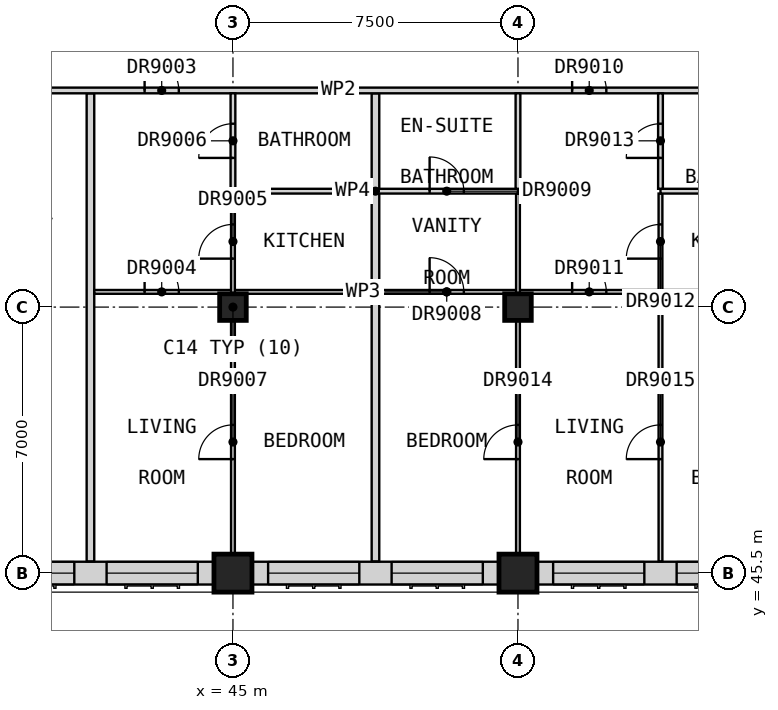
"""IFC4 building model, lengths in metres.
Left out: names, types, materials, properties, quantities, classifications, styles, units other than length and angle.
Written with IfcOpenShell. Run it as: python <this file> out.ifc"""

import sys

from ifc_helpers import new_model, si_unit, direction, frame, frame_2d, origin, origin_2d, place, context, subcontext, project, spatial, rectangle, extrude, element, fill, save


model = new_model("IFC4")
c1 = context("Model", 3, precision=1e-05, world=origin(), true_north=direction((0.0, 1.0)))
c2 = subcontext(c1, "Body", "Model", "MODEL_VIEW")
j1 = project(units=[si_unit("LENGTHUNIT", "METRE"), si_unit("PLANEANGLEUNIT", "RADIAN")], contexts=[c1])
p1 = place(None, origin())
s1 = spatial("IfcSite", under=j1, at=p1, CompositionType="ELEMENT")
p2 = place(p1, origin())
s2 = spatial("IfcBuilding", under=s1, at=p2, CompositionType="ELEMENT")
p3 = place(p2, frame((0.0, 0.0, 269.7)))
s3 = spatial("IfcBuildingStorey", under=s2, at=p3, CompositionType="ELEMENT", Elevation=269.7)
p4 = place(p3, frame((45.0, 45.5, 0.0), z_axis=(0.0, 0.0, 1.0), x_axis=(1.0, 0.0, 0.0)))
e1 = element("IfcColumn", 1, at=p4, inside=s3, PredefinedType="COLUMN", context=c2, shape_type="SweptSolid", body=[
    extrude(rectangle(XDim=1.0, YDim=1.0, at=origin_2d()), origin(), (0.0, 0.0, 1.0), 3.5),
])
p5 = place(p3, frame((45.0, 52.5, 0.0), z_axis=(0.0, 0.0, 1.0), x_axis=(1.0, 0.0, 0.0)))
e2 = element("IfcColumn", 2, at=p5, inside=s3, PredefinedType="COLUMN", context=c2, shape_type="SweptSolid", body=[
    extrude(rectangle(XDim=0.7, YDim=0.7, at=origin_2d()), origin(), (0.0, 0.0, 1.0), 3.5),
])
p6 = place(p3, frame((52.5, 45.5, 0.0), z_axis=(0.0, 0.0, 1.0), x_axis=(1.0, 0.0, 0.0)))
e3 = element("IfcColumn", 3, at=p6, inside=s3, PredefinedType="COLUMN", context=c2, shape_type="SweptSolid", body=[
    extrude(rectangle(XDim=1.0, YDim=1.0, at=origin_2d()), origin(), (0.0, 0.0, 1.0), 3.5),
])
p7 = place(p3, frame((52.5, 52.5, 0.0), z_axis=(0.0, 0.0, 1.0), x_axis=(1.0, 0.0, 0.0)))
e4 = element("IfcColumn", 4, at=p7, inside=s3, PredefinedType="COLUMN", context=c2, shape_type="SweptSolid", body=[
    extrude(rectangle(XDim=0.7, YDim=0.7, at=origin_2d()), origin(), (0.0, 0.0, 1.0), 3.5),
])
p8 = place(p3, frame((38.0, 45.5, 0.0), z_axis=(0.0, 0.0, 1.0), x_axis=(1.0, 0.0, 0.0)))
e5 = element("IfcWall", 5, at=p8, inside=s3, PredefinedType="SOLIDWALL", context=c2, shape_type="SweptSolid", body=[
    extrude(rectangle(XDim=6.5, YDim=0.6, at=frame_2d((3.25, 0.0))), origin(), (0.0, 0.0, 1.0), 2.75),
])
p9 = place(p8, frame((0.425, 0.0, 0.8)))
e6 = element("IfcOpeningElement", 6, at=p9, cuts=e5, PredefinedType="OPENING", context=c2, shape_type="SweptSolid", body=[
    extrude(rectangle(XDim=2.4, YDim=1.8, at=frame_2d((1.2, 0.9))), frame((0.0, 0.31, 0.0), z_axis=(0.0, -1.0, 0.0), x_axis=(1.0, 0.0, 0.0)), (0.0, 0.0, 1.0), 0.62),
])
p10 = place(p8, frame((3.675, 0.0, 0.8)))
e7 = element("IfcOpeningElement", 7, at=p10, cuts=e5, PredefinedType="OPENING", context=c2, shape_type="SweptSolid", body=[
    extrude(rectangle(XDim=2.4, YDim=1.8, at=frame_2d((1.2, 0.9))), frame((0.0, 0.31, 0.0), z_axis=(0.0, -1.0, 0.0), x_axis=(1.0, 0.0, 0.0)), (0.0, 0.0, 1.0), 0.62),
])
p11 = place(p3, frame((45.5, 45.5, 0.0), z_axis=(0.0, 0.0, 1.0), x_axis=(1.0, 0.0, 0.0)))
e8 = element("IfcWall", 8, at=p11, inside=s3, PredefinedType="SOLIDWALL", context=c2, shape_type="SweptSolid", body=[
    extrude(rectangle(XDim=6.5, YDim=0.6, at=frame_2d((3.25, 0.0))), origin(), (0.0, 0.0, 1.0), 2.75),
])
p12 = place(p11, frame((0.425, 0.0, 0.8)))
e9 = element("IfcOpeningElement", 9, at=p12, cuts=e8, PredefinedType="OPENING", context=c2, shape_type="SweptSolid", body=[
    extrude(rectangle(XDim=2.4, YDim=1.8, at=frame_2d((1.2, 0.9))), frame((0.0, 0.31, 0.0), z_axis=(0.0, -1.0, 0.0), x_axis=(1.0, 0.0, 0.0)), (0.0, 0.0, 1.0), 0.62),
])
p13 = place(p11, frame((3.675, 0.0, 0.8)))
e10 = element("IfcOpeningElement", 10, at=p13, cuts=e8, PredefinedType="OPENING", context=c2, shape_type="SweptSolid", body=[
    extrude(rectangle(XDim=2.4, YDim=1.8, at=frame_2d((1.2, 0.9))), frame((0.0, 0.31, 0.0), z_axis=(0.0, -1.0, 0.0), x_axis=(1.0, 0.0, 0.0)), (0.0, 0.0, 1.0), 0.62),
])
p14 = place(p3, frame((53.0, 45.5, 0.0), z_axis=(0.0, 0.0, 1.0), x_axis=(1.0, 0.0, 0.0)))
e11 = element("IfcWall", 11, at=p14, inside=s3, PredefinedType="SOLIDWALL", context=c2, shape_type="SweptSolid", body=[
    extrude(rectangle(XDim=6.5, YDim=0.6, at=frame_2d((3.25, 0.0))), origin(), (0.0, 0.0, 1.0), 2.75),
])
p15 = place(p14, frame((0.425, 0.0, 0.8)))
e12 = element("IfcOpeningElement", 12, at=p15, cuts=e11, PredefinedType="OPENING", context=c2, shape_type="SweptSolid", body=[
    extrude(rectangle(XDim=2.4, YDim=1.8, at=frame_2d((1.2, 0.9))), frame((0.0, 0.31, 0.0), z_axis=(0.0, -1.0, 0.0), x_axis=(1.0, 0.0, 0.0)), (0.0, 0.0, 1.0), 0.62),
])
p16 = place(p14, frame((3.675, 0.0, 0.8)))
e13 = element("IfcOpeningElement", 13, at=p16, cuts=e11, PredefinedType="OPENING", context=c2, shape_type="SweptSolid", body=[
    extrude(rectangle(XDim=2.4, YDim=1.8, at=frame_2d((1.2, 0.9))), frame((0.0, 0.31, 0.0), z_axis=(0.0, -1.0, 0.0), x_axis=(1.0, 0.0, 0.0)), (0.0, 0.0, 1.0), 0.62),
])
for number, where, z_axis, x_axis in (
    (14, (41.25, 45.81, 0.0), (0.0, 0.0, 1.0), (0.0, 1.0, 0.0)),
    (15, (48.75, 45.81, 0.0), (0.0, 0.0, 1.0), (0.0, 1.0, 0.0)),
):
    element("IfcWall", number, at=place(p3, frame(where, z_axis=z_axis, x_axis=x_axis)), inside=s3, PredefinedType="PARTITIONING", context=c2, shape_type="SweptSolid", body=[
        extrude(rectangle(XDim=12.315, YDim=0.2, at=frame_2d((6.157, 0.0))), origin(), (0.0, 0.0, 1.0), 3.25),
    ])
p17 = place(p3, frame((33.75, 58.2, 0.0), z_axis=(0.0, 0.0, 1.0), x_axis=(1.0, 0.0, 0.0)))
e16 = element("IfcWall", 16, at=p17, inside=s3, PredefinedType="PARTITIONING", context=c2, shape_type="SweptSolid", body=[
    extrude(rectangle(XDim=28.05, YDim=0.15, at=frame_2d((14.025, 0.0))), origin(), (0.0, 0.0, 1.0), 3.25),
])
p18 = place(p17, frame((3.25, 0.0, 0.0)))
e17 = element("IfcOpeningElement", 17, at=p18, cuts=e16, PredefinedType="OPENING", context=c2, shape_type="SweptSolid", body=[
    extrude(rectangle(XDim=1.0, YDim=2.1, at=frame_2d((0.5, 1.05))), frame((0.0, 0.085, 0.0), z_axis=(0.0, -1.0, 0.0), x_axis=(1.0, 0.0, 0.0)), (0.0, 0.0, 1.0), 0.17),
])
p19 = place(p17, frame((8.925, 0.0, 0.0)))
e18 = element("IfcOpeningElement", 18, at=p19, cuts=e16, PredefinedType="OPENING", context=c2, shape_type="SweptSolid", body=[
    extrude(rectangle(XDim=0.9, YDim=2.1, at=frame_2d((0.45, 1.05))), frame((0.0, 0.085, 0.0), z_axis=(0.0, -1.0, 0.0), x_axis=(1.0, 0.0, 0.0)), (0.0, 0.0, 1.0), 0.17),
])
p20 = place(p17, frame((20.175, 0.0, 0.0)))
e19 = element("IfcOpeningElement", 19, at=p20, cuts=e16, PredefinedType="OPENING", context=c2, shape_type="SweptSolid", body=[
    extrude(rectangle(XDim=0.9, YDim=2.1, at=frame_2d((0.45, 1.05))), frame((0.0, 0.085, 0.0), z_axis=(0.0, -1.0, 0.0), x_axis=(1.0, 0.0, 0.0)), (0.0, 0.0, 1.0), 0.17),
])
p21 = place(p17, frame((26.65, 0.0, 0.0)))
e20 = element("IfcOpeningElement", 20, at=p21, cuts=e16, PredefinedType="OPENING", context=c2, shape_type="SweptSolid", body=[
    extrude(rectangle(XDim=1.0, YDim=2.1, at=frame_2d((0.5, 1.05))), frame((0.0, 0.085, 0.0), z_axis=(0.0, -1.0, 0.0), x_axis=(1.0, 0.0, 0.0)), (0.0, 0.0, 1.0), 0.17),
])
p22 = place(p3, frame((41.35, 52.9, 0.0), z_axis=(0.0, 0.0, 1.0), x_axis=(1.0, 0.0, 0.0)))
e21 = element("IfcWall", 21, at=p22, inside=s3, PredefinedType="PARTITIONING", context=c2, shape_type="SweptSolid", body=[
    extrude(rectangle(XDim=18.55, YDim=0.1, at=frame_2d((9.275, 0.0))), origin(), (0.0, 0.0, 1.0), 3.25),
])
p23 = place(p22, frame((1.325, 0.0, 0.0)))
e22 = element("IfcOpeningElement", 22, at=p23, cuts=e21, PredefinedType="OPENING", context=c2, shape_type="SweptSolid", body=[
    extrude(rectangle(XDim=0.9, YDim=2.1, at=frame_2d((0.45, 1.05))), frame((0.0, 0.06, 0.0), z_axis=(0.0, -1.0, 0.0), x_axis=(1.0, 0.0, 0.0)), (0.0, 0.0, 1.0), 0.12),
])
p24 = place(p22, frame((8.825, 0.0, 0.0)))
e23 = element("IfcOpeningElement", 23, at=p24, cuts=e21, PredefinedType="OPENING", context=c2, shape_type="SweptSolid", body=[
    extrude(rectangle(XDim=0.9, YDim=2.1, at=frame_2d((0.45, 1.05))), frame((0.0, 0.06, 0.0), z_axis=(0.0, -1.0, 0.0), x_axis=(1.0, 0.0, 0.0)), (0.0, 0.0, 1.0), 0.12),
])
p25 = place(p22, frame((12.575, 0.0, 0.0)))
e24 = element("IfcOpeningElement", 24, at=p25, cuts=e21, PredefinedType="OPENING", context=c2, shape_type="SweptSolid", body=[
    extrude(rectangle(XDim=0.9, YDim=2.1, at=frame_2d((0.45, 1.05))), frame((0.0, 0.06, 0.0), z_axis=(0.0, -1.0, 0.0), x_axis=(1.0, 0.0, 0.0)), (0.0, 0.0, 1.0), 0.12),
])
p26 = place(p3, frame((45.0, 45.0, 0.0), z_axis=(0.0, 0.0, 1.0), x_axis=(0.0, 1.0, 0.0)))
e25 = element("IfcWall", 25, at=p26, inside=s3, PredefinedType="PARTITIONING", context=c2, shape_type="SweptSolid", body=[
    extrude(rectangle(XDim=10.488, YDim=0.1, at=frame_2d((5.244, 0.0))), origin(), (0.0, 0.0, 1.0), 3.25),
])
p27 = place(p26, frame((8.775, 0.0, 0.0)))
e26 = element("IfcOpeningElement", 26, at=p27, cuts=e25, PredefinedType="OPENING", context=c2, shape_type="SweptSolid", body=[
    extrude(rectangle(XDim=0.9, YDim=2.1, at=frame_2d((0.45, 1.05))), frame((0.0, 0.06, 0.0), z_axis=(0.0, -1.0, 0.0), x_axis=(1.0, 0.0, 0.0)), (0.0, 0.0, 1.0), 0.12),
])
p28 = place(p26, frame((3.5, 0.0, 0.0)))
e27 = element("IfcOpeningElement", 27, at=p28, cuts=e25, PredefinedType="OPENING", context=c2, shape_type="SweptSolid", body=[
    extrude(rectangle(XDim=0.9, YDim=2.1, at=frame_2d((0.45, 1.05))), frame((0.0, 0.06, 0.0), z_axis=(0.0, -1.0, 0.0), x_axis=(1.0, 0.0, 0.0)), (0.0, 0.0, 1.0), 0.12),
])
p29 = place(p3, frame((52.5, 45.0, 0.0), z_axis=(0.0, 0.0, 1.0), x_axis=(0.0, 1.0, 0.0)))
e28 = element("IfcWall", 28, at=p29, inside=s3, PredefinedType="PARTITIONING", context=c2, shape_type="SweptSolid", body=[
    extrude(rectangle(XDim=10.488, YDim=0.1, at=frame_2d((5.244, 0.0))), origin(), (0.0, 0.0, 1.0), 3.25),
])
p30 = place(p29, frame((3.5, 0.0, 0.0)))
e29 = element("IfcOpeningElement", 29, at=p30, cuts=e28, PredefinedType="OPENING", context=c2, shape_type="SweptSolid", body=[
    extrude(rectangle(XDim=0.9, YDim=2.1, at=frame_2d((0.45, 1.05))), frame((0.0, 0.06, 0.0), z_axis=(0.0, -1.0, 0.0), x_axis=(1.0, 0.0, 0.0)), (0.0, 0.0, 1.0), 0.12),
])
p31 = place(p3, frame((56.25, 45.81, 0.0), z_axis=(0.0, 0.0, 1.0), x_axis=(0.0, 1.0, 0.0)))
e30 = element("IfcWall", 30, at=p31, inside=s3, PredefinedType="PARTITIONING", context=c2, shape_type="SweptSolid", body=[
    extrude(rectangle(XDim=9.677, YDim=0.1, at=frame_2d((4.839, 0.0))), origin(), (0.0, 0.0, 1.0), 3.25),
])
p32 = place(p31, frame((7.965, 0.0, 0.0)))
e31 = element("IfcOpeningElement", 31, at=p32, cuts=e30, PredefinedType="OPENING", context=c2, shape_type="SweptSolid", body=[
    extrude(rectangle(XDim=0.9, YDim=2.1, at=frame_2d((0.45, 1.05))), frame((0.0, 0.06, 0.0), z_axis=(0.0, -1.0, 0.0), x_axis=(1.0, 0.0, 0.0)), (0.0, 0.0, 1.0), 0.12),
])
p33 = place(p31, frame((2.69, 0.0, 0.0)))
e32 = element("IfcOpeningElement", 32, at=p33, cuts=e30, PredefinedType="OPENING", context=c2, shape_type="SweptSolid", body=[
    extrude(rectangle(XDim=0.9, YDim=2.1, at=frame_2d((0.45, 1.05))), frame((0.0, 0.06, 0.0), z_axis=(0.0, -1.0, 0.0), x_axis=(1.0, 0.0, 0.0)), (0.0, 0.0, 1.0), 0.12),
])
p34 = place(p3, frame((45.0, 55.55, 0.0), z_axis=(0.0, 0.0, 1.0), x_axis=(1.0, 0.0, 0.0)))
e33 = element("IfcWall", 33, at=p34, inside=s3, PredefinedType="PARTITIONING", context=c2, shape_type="SweptSolid", body=[
    extrude(rectangle(XDim=7.5, YDim=0.125, at=frame_2d((3.75, 0.0))), origin(), (0.0, 0.0, 1.0), 3.25),
])
p35 = place(p34, frame((5.175, 0.0, 0.0)))
e34 = element("IfcOpeningElement", 34, at=p35, cuts=e33, PredefinedType="OPENING", context=c2, shape_type="SweptSolid", body=[
    extrude(rectangle(XDim=0.9, YDim=2.1, at=frame_2d((0.45, 1.05))), frame((0.0, 0.073, 0.0), z_axis=(0.0, -1.0, 0.0), x_axis=(1.0, 0.0, 0.0)), (0.0, 0.0, 1.0), 0.145),
])
p36 = place(p3, frame((56.25, 55.55, 0.0), z_axis=(0.0, 0.0, 1.0), x_axis=(1.0, 0.0, 0.0)))
e35 = element("IfcWall", 35, at=p36, inside=s3, PredefinedType="PARTITIONING", context=c2, shape_type="SweptSolid", body=[
    extrude(rectangle(XDim=3.65, YDim=0.125, at=frame_2d((1.825, 0.0))), origin(), (0.0, 0.0, 1.0), 3.25),
])
p37 = place(p3, frame((45.0, 55.613, 0.0), z_axis=(0.0, 0.0, 1.0), x_axis=(0.0, 1.0, 0.0)))
e36 = element("IfcWall", 36, at=p37, inside=s3, PredefinedType="PARTITIONING", context=c2, shape_type="SweptSolid", body=[
    extrude(rectangle(XDim=2.512, YDim=0.125, at=frame_2d((1.256, 0.0))), origin(), (0.0, 0.0, 1.0), 3.25),
])
p38 = place(p37, frame((0.812, 0.0, 0.0)))
e37 = element("IfcOpeningElement", 37, at=p38, cuts=e36, PredefinedType="OPENING", context=c2, shape_type="SweptSolid", body=[
    extrude(rectangle(XDim=0.9, YDim=2.1, at=frame_2d((0.45, 1.05))), frame((0.0, 0.073, 0.0), z_axis=(0.0, -1.0, 0.0), x_axis=(1.0, 0.0, 0.0)), (0.0, 0.0, 1.0), 0.145),
])
p39 = place(p3, frame((52.5, 55.613, 0.0), z_axis=(0.0, 0.0, 1.0), x_axis=(0.0, 1.0, 0.0)))
e38 = element("IfcWall", 38, at=p39, inside=s3, PredefinedType="PARTITIONING", context=c2, shape_type="SweptSolid", body=[
    extrude(rectangle(XDim=2.512, YDim=0.125, at=frame_2d((1.256, 0.0))), origin(), (0.0, 0.0, 1.0), 3.25),
])
p40 = place(p3, frame((56.25, 55.613, 0.0), z_axis=(0.0, 0.0, 1.0), x_axis=(0.0, 1.0, 0.0)))
e39 = element("IfcWall", 39, at=p40, inside=s3, PredefinedType="PARTITIONING", context=c2, shape_type="SweptSolid", body=[
    extrude(rectangle(XDim=2.512, YDim=0.125, at=frame_2d((1.256, 0.0))), origin(), (0.0, 0.0, 1.0), 3.25),
])
p41 = place(p40, frame((0.812, 0.0, 0.0)))
e40 = element("IfcOpeningElement", 40, at=p41, cuts=e39, PredefinedType="OPENING", context=c2, shape_type="SweptSolid", body=[
    extrude(rectangle(XDim=0.9, YDim=2.1, at=frame_2d((0.45, 1.05))), frame((0.0, 0.073, 0.0), z_axis=(0.0, -1.0, 0.0), x_axis=(1.0, 0.0, 0.0)), (0.0, 0.0, 1.0), 0.145),
])
p42 = place(p9, origin())
e41 = element("IfcWindow", 41, at=p42, inside=s3, PartitioningType="SINGLE_PANEL", PredefinedType="WINDOW", context=c2, shape_type="SweptSolid", body=[
    extrude(rectangle(XDim=2.4, YDim=1.8, at=frame_2d((1.2, 0.9))), frame((0.0, -0.07, 0.0), z_axis=(0.0, -1.0, 0.0), x_axis=(1.0, 0.0, 0.0)), (0.0, 0.0, 1.0), 0.06),
])
fill(e6, e41)
p43 = place(p10, origin())
e42 = element("IfcWindow", 42, at=p43, inside=s3, PartitioningType="SINGLE_PANEL", PredefinedType="WINDOW", context=c2, shape_type="SweptSolid", body=[
    extrude(rectangle(XDim=2.4, YDim=1.8, at=frame_2d((1.2, 0.9))), frame((0.0, -0.07, 0.0), z_axis=(0.0, -1.0, 0.0), x_axis=(1.0, 0.0, 0.0)), (0.0, 0.0, 1.0), 0.06),
])
fill(e7, e42)
p44 = place(p12, origin())
e43 = element("IfcWindow", 43, at=p44, inside=s3, PartitioningType="SINGLE_PANEL", PredefinedType="WINDOW", context=c2, shape_type="SweptSolid", body=[
    extrude(rectangle(XDim=2.4, YDim=1.8, at=frame_2d((1.2, 0.9))), frame((0.0, -0.07, 0.0), z_axis=(0.0, -1.0, 0.0), x_axis=(1.0, 0.0, 0.0)), (0.0, 0.0, 1.0), 0.06),
])
fill(e9, e43)
p45 = place(p13, origin())
e44 = element("IfcWindow", 44, at=p45, inside=s3, PartitioningType="SINGLE_PANEL", PredefinedType="WINDOW", context=c2, shape_type="SweptSolid", body=[
    extrude(rectangle(XDim=2.4, YDim=1.8, at=frame_2d((1.2, 0.9))), frame((0.0, -0.07, 0.0), z_axis=(0.0, -1.0, 0.0), x_axis=(1.0, 0.0, 0.0)), (0.0, 0.0, 1.0), 0.06),
])
fill(e10, e44)
p46 = place(p15, origin())
e45 = element("IfcWindow", 45, at=p46, inside=s3, PartitioningType="SINGLE_PANEL", PredefinedType="WINDOW", context=c2, shape_type="SweptSolid", body=[
    extrude(rectangle(XDim=2.4, YDim=1.8, at=frame_2d((1.2, 0.9))), frame((0.0, -0.07, 0.0), z_axis=(0.0, -1.0, 0.0), x_axis=(1.0, 0.0, 0.0)), (0.0, 0.0, 1.0), 0.06),
])
fill(e12, e45)
p47 = place(p16, origin())
e46 = element("IfcWindow", 46, at=p47, inside=s3, PartitioningType="SINGLE_PANEL", PredefinedType="WINDOW", context=c2, shape_type="SweptSolid", body=[
    extrude(rectangle(XDim=2.4, YDim=1.8, at=frame_2d((1.2, 0.9))), frame((0.0, -0.07, 0.0), z_axis=(0.0, -1.0, 0.0), x_axis=(1.0, 0.0, 0.0)), (0.0, 0.0, 1.0), 0.06),
])
fill(e13, e46)
p48 = place(p19, origin())
e47 = element("IfcDoor", 47, at=p48, inside=s3, OperationType="SINGLE_SWING_RIGHT", PredefinedType="DOOR", context=c2, shape_type="SweptSolid", body=[
    extrude(rectangle(XDim=0.9, YDim=2.1, at=frame_2d((0.45, 1.05))), frame((0.0, 0.025, 0.0), z_axis=(0.0, -1.0, 0.0), x_axis=(1.0, 0.0, 0.0)), (0.0, 0.0, 1.0), 0.05),
])
fill(e18, e47)
p49 = place(p23, origin())
e48 = element("IfcDoor", 48, at=p49, inside=s3, OperationType="SINGLE_SWING_LEFT", PredefinedType="DOOR", context=c2, shape_type="SweptSolid", body=[
    extrude(rectangle(XDim=0.9, YDim=2.1, at=frame_2d((0.45, 1.05))), frame((0.0, 0.025, 0.0), z_axis=(0.0, -1.0, 0.0), x_axis=(1.0, 0.0, 0.0)), (0.0, 0.0, 1.0), 0.05),
])
fill(e22, e48)
p50 = place(p27, origin())
e49 = element("IfcDoor", 49, at=p50, inside=s3, OperationType="SINGLE_SWING_LEFT", PredefinedType="DOOR", context=c2, shape_type="SweptSolid", body=[
    extrude(rectangle(XDim=0.9, YDim=2.1, at=frame_2d((0.45, 1.05))), frame((0.0, 0.025, 0.0), z_axis=(0.0, -1.0, 0.0), x_axis=(1.0, 0.0, 0.0)), (0.0, 0.0, 1.0), 0.05),
])
fill(e26, e49)
p51 = place(p38, origin())
e50 = element("IfcDoor", 50, at=p51, inside=s3, OperationType="SINGLE_SWING_RIGHT", PredefinedType="DOOR", context=c2, shape_type="SweptSolid", body=[
    extrude(rectangle(XDim=0.9, YDim=2.1, at=frame_2d((0.45, 1.05))), frame((0.0, 0.025, 0.0), z_axis=(0.0, -1.0, 0.0), x_axis=(1.0, 0.0, 0.0)), (0.0, 0.0, 1.0), 0.05),
])
fill(e37, e50)
p52 = place(p28, origin())
e51 = element("IfcDoor", 51, at=p52, inside=s3, OperationType="SINGLE_SWING_LEFT", PredefinedType="DOOR", context=c2, shape_type="SweptSolid", body=[
    extrude(rectangle(XDim=0.9, YDim=2.1, at=frame_2d((0.45, 1.05))), frame((0.0, 0.025, 0.0), z_axis=(0.0, -1.0, 0.0), x_axis=(1.0, 0.0, 0.0)), (0.0, 0.0, 1.0), 0.05),
])
fill(e27, e51)
p53 = place(p24, origin())
e52 = element("IfcDoor", 52, at=p53, inside=s3, OperationType="SINGLE_SWING_LEFT", PredefinedType="DOOR", context=c2, shape_type="SweptSolid", body=[
    extrude(rectangle(XDim=0.9, YDim=2.1, at=frame_2d((0.45, 1.05))), frame((0.0, 0.025, 0.0), z_axis=(0.0, -1.0, 0.0), x_axis=(1.0, 0.0, 0.0)), (0.0, 0.0, 1.0), 0.05),
])
fill(e23, e52)
p54 = place(p35, origin())
e53 = element("IfcDoor", 53, at=p54, inside=s3, OperationType="SINGLE_SWING_LEFT", PredefinedType="DOOR", context=c2, shape_type="SweptSolid", body=[
    extrude(rectangle(XDim=0.9, YDim=2.1, at=frame_2d((0.45, 1.05))), frame((0.0, 0.025, 0.0), z_axis=(0.0, -1.0, 0.0), x_axis=(1.0, 0.0, 0.0)), (0.0, 0.0, 1.0), 0.05),
])
fill(e34, e53)
p55 = place(p20, origin())
e54 = element("IfcDoor", 54, at=p55, inside=s3, OperationType="SINGLE_SWING_RIGHT", PredefinedType="DOOR", context=c2, shape_type="SweptSolid", body=[
    extrude(rectangle(XDim=0.9, YDim=2.1, at=frame_2d((0.45, 1.05))), frame((0.0, 0.025, 0.0), z_axis=(0.0, -1.0, 0.0), x_axis=(1.0, 0.0, 0.0)), (0.0, 0.0, 1.0), 0.05),
])
fill(e19, e54)
p56 = place(p25, origin())
e55 = element("IfcDoor", 55, at=p56, inside=s3, OperationType="SINGLE_SWING_LEFT", PredefinedType="DOOR", context=c2, shape_type="SweptSolid", body=[
    extrude(rectangle(XDim=0.9, YDim=2.1, at=frame_2d((0.45, 1.05))), frame((0.0, 0.025, 0.0), z_axis=(0.0, -1.0, 0.0), x_axis=(1.0, 0.0, 0.0)), (0.0, 0.0, 1.0), 0.05),
])
fill(e24, e55)
p57 = place(p32, origin())
e56 = element("IfcDoor", 56, at=p57, inside=s3, OperationType="SINGLE_SWING_LEFT", PredefinedType="DOOR", context=c2, shape_type="SweptSolid", body=[
    extrude(rectangle(XDim=0.9, YDim=2.1, at=frame_2d((0.45, 1.05))), frame((0.0, 0.025, 0.0), z_axis=(0.0, -1.0, 0.0), x_axis=(1.0, 0.0, 0.0)), (0.0, 0.0, 1.0), 0.05),
])
fill(e31, e56)
p58 = place(p41, origin())
e57 = element("IfcDoor", 57, at=p58, inside=s3, OperationType="SINGLE_SWING_RIGHT", PredefinedType="DOOR", context=c2, shape_type="SweptSolid", body=[
    extrude(rectangle(XDim=0.9, YDim=2.1, at=frame_2d((0.45, 1.05))), frame((0.0, 0.025, 0.0), z_axis=(0.0, -1.0, 0.0), x_axis=(1.0, 0.0, 0.0)), (0.0, 0.0, 1.0), 0.05),
])
fill(e40, e57)
p59 = place(p30, origin())
e58 = element("IfcDoor", 58, at=p59, inside=s3, OperationType="SINGLE_SWING_LEFT", PredefinedType="DOOR", context=c2, shape_type="SweptSolid", body=[
    extrude(rectangle(XDim=0.9, YDim=2.1, at=frame_2d((0.45, 1.05))), frame((0.0, 0.025, 0.0), z_axis=(0.0, -1.0, 0.0), x_axis=(1.0, 0.0, 0.0)), (0.0, 0.0, 1.0), 0.05),
])
fill(e29, e58)
p60 = place(p33, origin())
e59 = element("IfcDoor", 59, at=p60, inside=s3, OperationType="SINGLE_SWING_LEFT", PredefinedType="DOOR", context=c2, shape_type="SweptSolid", body=[
    extrude(rectangle(XDim=0.9, YDim=2.1, at=frame_2d((0.45, 1.05))), frame((0.0, 0.025, 0.0), z_axis=(0.0, -1.0, 0.0), x_axis=(1.0, 0.0, 0.0)), (0.0, 0.0, 1.0), 0.05),
])
fill(e32, e59)
save(model, sys.argv[1])
